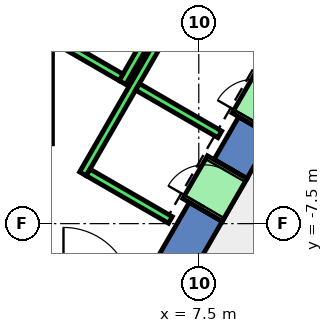
"""IFC4 building model, lengths in metres.
Left out: names, types, materials, properties, quantities, classifications, styles, units other than length and angle.
Written with IfcOpenShell. Run it as: python <this file> out.ifc"""

import sys

from ifc_helpers import new_model, si_unit, direction, frame, frame_2d, origin, place, context, subcontext, project, spatial, polyline, rectangle, outline, extrude, element, fill, save


model = new_model("IFC4")
c1 = context("Model", 3, precision=1e-05, world=origin(), true_north=direction((0.0, 1.0)))
c2 = subcontext(c1, "Body", "Model", "MODEL_VIEW")
j1 = project(units=[si_unit("LENGTHUNIT", "METRE"), si_unit("PLANEANGLEUNIT", "RADIAN")], contexts=[c1])
p1 = place(None, origin())
s1 = spatial("IfcSite", under=j1, at=p1, CompositionType="ELEMENT")
p2 = place(p1, origin())
s2 = spatial("IfcBuilding", under=s1, at=p2, CompositionType="ELEMENT")
p3 = place(p2, frame((0.0, 0.0, 20.0)))
s3 = spatial("IfcBuildingStorey", under=s2, at=p3, CompositionType="ELEMENT", Elevation=20.0)
p4 = place(p3, frame((0.0, 0.0, -0.45)))
e1 = element("IfcWall", 1, at=p4, inside=s3, PredefinedType="SHEAR", context=c2, shape_type="SweptSolid", body=[
    extrude(outline(polyline([(8.117, -7.44), (7.252, -6.94), (6.351, -8.5), (6.928, -9.5), (8.117, -7.44)])), origin(), (0.0, 0.0, 1.0), 5.0),
])
p5 = place(p3, frame((0.0, 0.0, -0.45)))
e2 = element("IfcWall", 2, at=p5, inside=s3, PredefinedType="SHEAR", context=c2, shape_type="SweptSolid", body=[
    extrude(outline(polyline([(9.417, -5.189), (8.551, -4.689), (7.902, -5.814), (8.767, -6.314), (9.417, -5.189)])), origin(), (0.0, 0.0, 1.0), 5.0),
])
p6 = place(p3, frame((0.0, 0.0, 3.6)))
e3 = element("IfcWall", 3, at=p6, inside=s3, PredefinedType="SHEAR", context=c2, shape_type="SweptSolid", body=[
    extrude(outline(polyline([(8.767, -6.314), (7.902, -5.814), (7.252, -6.94), (8.117, -7.44), (8.767, -6.314)])), origin(), (0.0, 0.0, 1.0), 0.95),
])
p7 = place(p3, frame((0.0, 0.0, 3.6)))
e4 = element("IfcWall", 4, at=p7, inside=s3, PredefinedType="SHEAR", context=c2, shape_type="SweptSolid", body=[
    extrude(outline(polyline([(10.067, -4.063), (9.201, -3.563), (8.551, -4.689), (9.417, -5.189), (10.067, -4.063)])), origin(), (0.0, 0.0, 1.0), 0.95),
])
p8 = place(p3, frame((5.492, -3.788, 0.0), z_axis=(0.0, 0.0, 1.0), x_axis=(0.500011755427, 0.866018616679, 0.0)))
e5 = element("IfcWall", 5, at=p8, inside=s3, PredefinedType="STANDARD", context=c2, shape_type="SweptSolid", body=[
    extrude(rectangle(XDim=2.8, YDim=0.2, at=frame_2d((1.4, 0.0))), origin(), (0.0, 0.0, 1.0), 4.55),
])
p9 = place(p3, frame((3.377, -2.452, 0.0), z_axis=(0.0, 0.0, 1.0), x_axis=(0.865955154139, -0.50012165622, 0.0)))
e6 = element("IfcWall", 6, at=p9, inside=s3, PredefinedType="STANDARD", context=c2, shape_type="SweptSolid", body=[
    extrude(rectangle(XDim=2.4, YDim=0.2, at=frame_2d((1.2, 0.0))), origin(), (0.0, 0.0, 1.0), 4.55),
])
p10 = place(p3, frame((4.451, -6.19, 0.0), z_axis=(0.0, 0.0, 1.0), x_axis=(0.50000090737, 0.866024879913, 0.0)))
e7 = element("IfcWall", 7, at=p10, inside=s3, PredefinedType="STANDARD", context=c2, shape_type="SweptSolid", body=[
    extrude(rectangle(XDim=10.6, YDim=0.2, at=frame_2d((5.3, 0.0))), origin(), (0.0, 0.0, 1.0), 4.55),
])
for number, where, z_axis, x_axis in (
    (8, (4.588, -6.153, 0.0), (0.0, 0.0, 1.0), (0.866, -0.5, 0.0)),
    (9, (5.888, -3.902, 0.0), (0.0, 0.0, 1.0), (0.866, -0.5, 0.0)),
):
    element("IfcWall", number, at=place(p3, frame(where, z_axis=z_axis, x_axis=x_axis)), inside=s3, PredefinedType="STANDARD", context=c2, shape_type="SweptSolid", body=[
        extrude(rectangle(XDim=2.5, YDim=0.2, at=frame_2d((1.25, 0.0))), origin(), (0.0, 0.0, 1.0), 4.55),
    ])
p11 = place(p3, frame((7.598, -7.14, 0.0), z_axis=(0.0, 0.0, 1.0), x_axis=(0.500362116554, 0.865816234728, 0.0)))
e10 = element("IfcWall", 10, at=p11, inside=s3, PredefinedType="STANDARD", context=c2, shape_type="SweptSolid", body=[
    extrude(rectangle(XDim=1.299, YDim=1.2, at=frame_2d((0.65, 0.0))), origin(), (0.0, 0.0, 1.0), 2.4),
])
p12 = place(p11, frame((0.1, 0.0, 0.0)))
e11 = element("IfcOpeningElement", 11, at=p12, cuts=e10, PredefinedType="OPENING", context=c2, shape_type="SweptSolid", body=[
    extrude(rectangle(XDim=1.1, YDim=2.3, at=frame_2d((0.55, 1.15))), frame((0.0, 0.61, 0.0), z_axis=(0.0, -1.0, 0.0), x_axis=(1.0, 0.0, 0.0)), (0.0, 0.0, 1.0), 1.22),
])
p13 = place(p3, frame((8.898, -4.889, 0.0), z_axis=(0.0, 0.0, 1.0), x_axis=(0.500036693733, 0.866004217611, 0.0)))
e12 = element("IfcWall", 12, at=p13, inside=s3, PredefinedType="STANDARD", context=c2, shape_type="SweptSolid", body=[
    extrude(rectangle(XDim=1.3, YDim=1.2, at=frame_2d((0.65, 0.0))), origin(), (0.0, 0.0, 1.0), 2.4),
])
p14 = place(p13, frame((0.1, 0.0, 0.0)))
e13 = element("IfcOpeningElement", 13, at=p14, cuts=e12, PredefinedType="OPENING", context=c2, shape_type="SweptSolid", body=[
    extrude(rectangle(XDim=1.1, YDim=2.3, at=frame_2d((0.55, 1.15))), frame((0.0, 0.61, 0.0), z_axis=(0.0, -1.0, 0.0), x_axis=(1.0, 0.0, 0.0)), (0.0, 0.0, 1.0), 1.22),
])
p15 = place(p3, frame((3.55, -2.667, 0.0), z_axis=(0.0, 0.0, 1.0), x_axis=(0.0, -1.0, 0.0)))
e14 = element("IfcWall", 14, at=p15, inside=s3, PredefinedType="STANDARD", context=c2, shape_type="SweptSolid", body=[
    extrude(rectangle(XDim=2.733, YDim=0.2, at=frame_2d((1.366, 0.0))), origin(), (0.0, 0.0, 1.0), 4.55),
])
p16 = place(p12, origin())
e15 = element("IfcDoor", 15, at=p16, inside=s3, OperationType="SLIDING_TO_LEFT", PredefinedType="DOOR", context=c2, shape_type="SweptSolid", body=[
    extrude(rectangle(XDim=1.1, YDim=2.3, at=frame_2d((0.55, 1.15))), frame((0.0, 0.025, 0.0), z_axis=(0.0, -1.0, 0.0), x_axis=(1.0, 0.0, 0.0)), (0.0, 0.0, 1.0), 0.05),
])
fill(e11, e15)
save(model, sys.argv[1])
